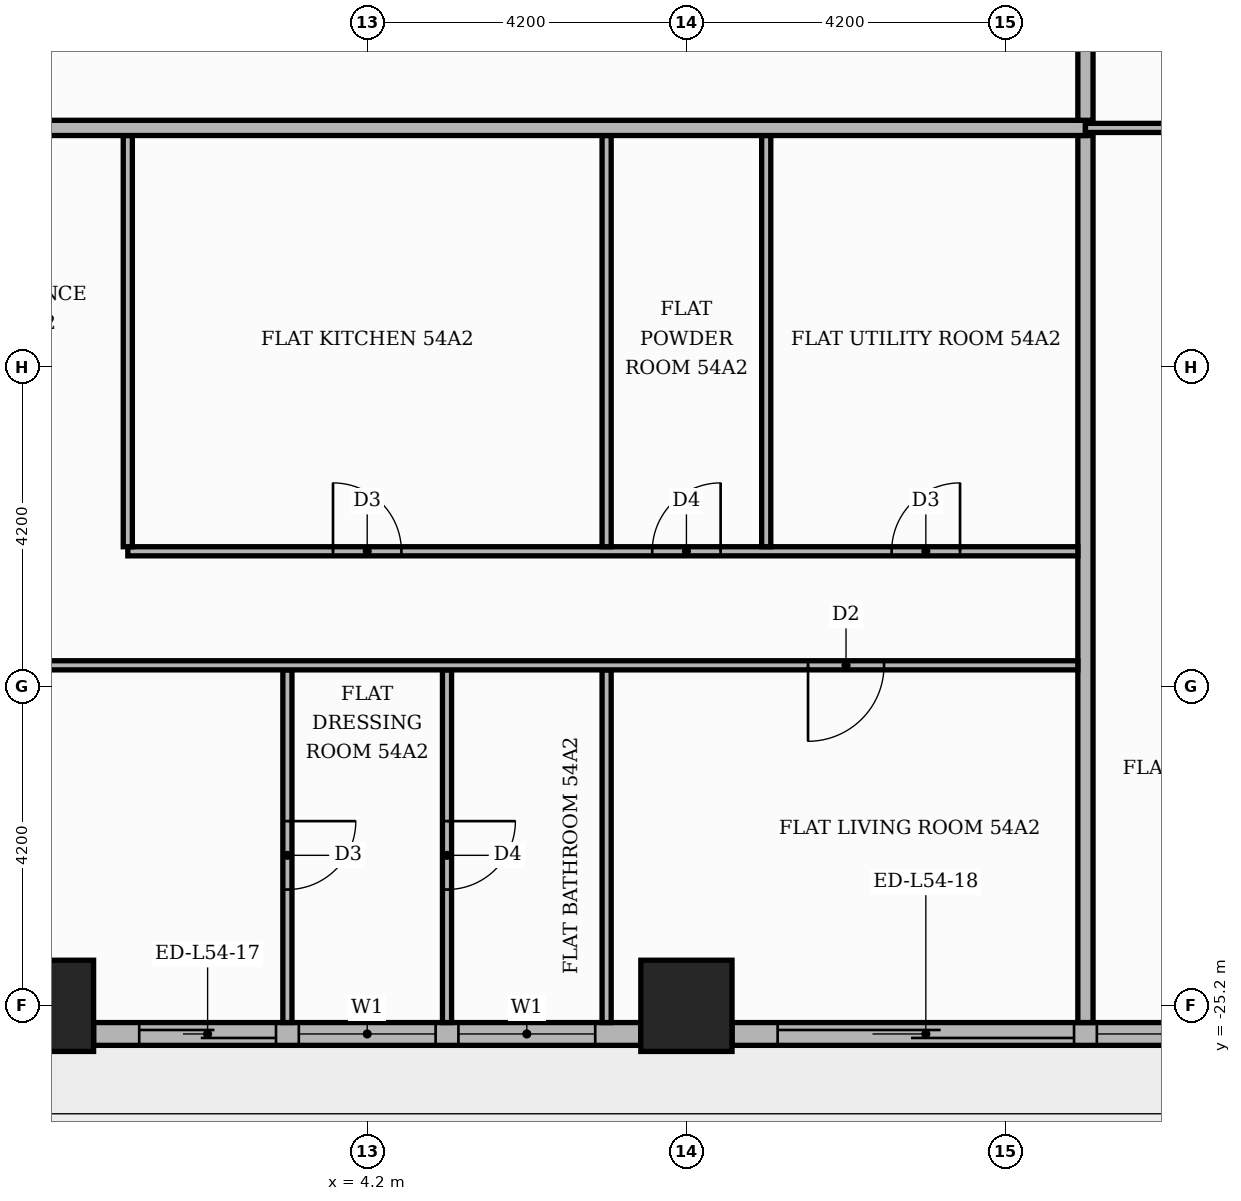
"""IFC4 building model, lengths in metres.
Left out: names, types, materials, properties, quantities, classifications, styles, units other than length and angle.
Written with IfcOpenShell. Run it as: python <this file> out.ifc"""

import sys

from ifc_helpers import new_model, si_unit, direction, frame, frame_2d, origin, origin_2d, place, context, subcontext, project, spatial, rectangle, extrude, element, fill, save


model = new_model("IFC4")
c1 = context("Model", 3, precision=1e-05, world=origin(), true_north=direction((0.0, 1.0)))
c2 = subcontext(c1, "Body", "Model", "MODEL_VIEW")
j1 = project(units=[si_unit("LENGTHUNIT", "METRE"), si_unit("PLANEANGLEUNIT", "RADIAN")], contexts=[c1])
p1 = place(None, origin())
s1 = spatial("IfcSite", under=j1, at=p1, CompositionType="ELEMENT")
p2 = place(p1, origin())
s2 = spatial("IfcBuilding", under=s1, at=p2, CompositionType="ELEMENT")
p3 = place(p2, frame((0.0, 0.0, 227.4)))
s3 = spatial("IfcBuildingStorey", under=s2, at=p3, CompositionType="ELEMENT", Elevation=227.4)
for number, where, z_axis, x_axis in (
    (1, (0.0, -25.2, 0.0), (0.0, 0.0, 1.0), (1.0, 0.0, 0.0)),
    (2, (8.4, -25.2, 0.0), (0.0, 0.0, 1.0), (1.0, 0.0, 0.0)),
):
    element("IfcColumn", number, at=place(p3, frame(where, z_axis=z_axis, x_axis=x_axis)), inside=s3, PredefinedType="COLUMN", context=c2, shape_type="SweptSolid", body=[
        extrude(rectangle(XDim=1.2, YDim=1.2, at=origin_2d()), origin(), (0.0, 0.0, 1.0), 3.9),
    ])
p4 = place(p3, frame((0.6, -25.57, 0.0), z_axis=(0.0, 0.0, 1.0), x_axis=(1.0, 0.0, 0.0)))
e3 = element("IfcWall", 3, at=p4, inside=s3, PredefinedType="STANDARD", context=c2, shape_type="SweptSolid", body=[
    extrude(rectangle(XDim=7.2, YDim=0.3, at=frame_2d((3.6, 0.0))), origin(), (0.0, 0.0, 1.0), 3.48),
])
p5 = place(p4, frame((0.6, 0.0, 0.0)))
e4 = element("IfcOpeningElement", 4, at=p5, cuts=e3, PredefinedType="OPENING", context=c2, shape_type="SweptSolid", body=[
    extrude(rectangle(XDim=1.8, YDim=2.4, at=frame_2d((0.9, 1.2))), frame((0.0, 0.16, 0.0), z_axis=(0.0, -1.0, 0.0), x_axis=(1.0, 0.0, 0.0)), (0.0, 0.0, 1.0), 0.32),
])
p6 = place(p4, frame((2.7, 0.0, 0.9)))
e5 = element("IfcOpeningElement", 5, at=p6, cuts=e3, PredefinedType="OPENING", context=c2, shape_type="SweptSolid", body=[
    extrude(rectangle(XDim=1.8, YDim=2.1, at=frame_2d((0.9, 1.05))), frame((0.0, 0.16, 0.0), z_axis=(0.0, -1.0, 0.0), x_axis=(1.0, 0.0, 0.0)), (0.0, 0.0, 1.0), 0.32),
])
p7 = place(p4, frame((4.8, 0.0, 0.9)))
e6 = element("IfcOpeningElement", 6, at=p7, cuts=e3, PredefinedType="OPENING", context=c2, shape_type="SweptSolid", body=[
    extrude(rectangle(XDim=1.8, YDim=2.1, at=frame_2d((0.9, 1.05))), frame((0.0, 0.16, 0.0), z_axis=(0.0, -1.0, 0.0), x_axis=(1.0, 0.0, 0.0)), (0.0, 0.0, 1.0), 0.32),
])
p8 = place(p3, frame((9.0, -25.57, 0.0), z_axis=(0.0, 0.0, 1.0), x_axis=(1.0, 0.0, 0.0)))
e7 = element("IfcWall", 7, at=p8, inside=s3, PredefinedType="STANDARD", context=c2, shape_type="SweptSolid", body=[
    extrude(rectangle(XDim=7.2, YDim=0.3, at=frame_2d((3.6, 0.0))), origin(), (0.0, 0.0, 1.0), 3.48),
])
p9 = place(p8, frame((0.6, 0.0, 0.0)))
e8 = element("IfcOpeningElement", 8, at=p9, cuts=e7, PredefinedType="OPENING", context=c2, shape_type="SweptSolid", body=[
    extrude(rectangle(XDim=3.9, YDim=2.4, at=frame_2d((1.95, 1.2))), frame((0.0, 0.16, 0.0), z_axis=(0.0, -1.0, 0.0), x_axis=(1.0, 0.0, 0.0)), (0.0, 0.0, 1.0), 0.32),
])
p10 = place(p8, frame((4.8, 0.0, 0.9)))
e9 = element("IfcOpeningElement", 9, at=p10, cuts=e7, PredefinedType="OPENING", context=c2, shape_type="SweptSolid", body=[
    extrude(rectangle(XDim=1.8, YDim=2.1, at=frame_2d((0.9, 1.05))), frame((0.0, 0.16, 0.0), z_axis=(0.0, -1.0, 0.0), x_axis=(1.0, 0.0, 0.0)), (0.0, 0.0, 1.0), 0.32),
])
p11 = place(p3, frame((3.15, -25.42, 0.0), z_axis=(0.0, 0.0, 1.0), x_axis=(0.0, 1.0, 0.0)))
e10 = element("IfcWall", 10, at=p11, inside=s3, PredefinedType="PARTITIONING", context=c2, shape_type="SweptSolid", body=[
    extrude(rectangle(XDim=4.64, YDim=0.12, at=frame_2d((2.32, 0.0))), origin(), (0.0, 0.0, 1.0), 3.48),
])
p12 = place(p11, frame((1.75, 0.0, 0.0)))
e11 = element("IfcOpeningElement", 11, at=p12, cuts=e10, PredefinedType="OPENING", context=c2, shape_type="SweptSolid", body=[
    extrude(rectangle(XDim=0.9, YDim=2.1, at=frame_2d((0.45, 1.05))), frame((0.0, 0.07, 0.0), z_axis=(0.0, -1.0, 0.0), x_axis=(1.0, 0.0, 0.0)), (0.0, 0.0, 1.0), 0.14),
])
p13 = place(p3, frame((5.25, -25.42, 0.0), z_axis=(0.0, 0.0, 1.0), x_axis=(0.0, 1.0, 0.0)))
e12 = element("IfcWall", 12, at=p13, inside=s3, PredefinedType="PARTITIONING", context=c2, shape_type="SweptSolid", body=[
    extrude(rectangle(XDim=4.64, YDim=0.12, at=frame_2d((2.32, 0.0))), origin(), (0.0, 0.0, 1.0), 3.48),
])
p14 = place(p13, frame((1.75, 0.0, 0.0)))
e13 = element("IfcOpeningElement", 13, at=p14, cuts=e12, PredefinedType="OPENING", context=c2, shape_type="SweptSolid", body=[
    extrude(rectangle(XDim=0.9, YDim=2.1, at=frame_2d((0.45, 1.05))), frame((0.0, 0.07, 0.0), z_axis=(0.0, -1.0, 0.0), x_axis=(1.0, 0.0, 0.0)), (0.0, 0.0, 1.0), 0.14),
])
p15 = place(p3, frame((7.35, -25.42, 0.0), z_axis=(0.0, 0.0, 1.0), x_axis=(0.0, 1.0, 0.0)))
e14 = element("IfcWall", 14, at=p15, inside=s3, PredefinedType="PARTITIONING", context=c2, shape_type="SweptSolid", body=[
    extrude(rectangle(XDim=4.64, YDim=0.12, at=frame_2d((2.32, 0.0))), origin(), (0.0, 0.0, 1.0), 3.48),
])
p16 = place(p3, frame((13.65, -25.42, 0.0), z_axis=(0.0, 0.0, 1.0), x_axis=(0.0, 1.0, 0.0)))
e15 = element("IfcWall", 15, at=p16, inside=s3, PredefinedType="PARTITIONING", context=c2, shape_type="SweptSolid", body=[
    extrude(rectangle(XDim=11.67, YDim=0.2, at=frame_2d((5.835, 0.0))), origin(), (0.0, 0.0, 1.0), 3.48),
])
p17 = place(p3, frame((-5.15, -20.72, 0.0), z_axis=(0.0, 0.0, 1.0), x_axis=(1.0, 0.0, 0.0)))
e16 = element("IfcWall", 16, at=p17, inside=s3, PredefinedType="PARTITIONING", context=c2, shape_type="SweptSolid", body=[
    extrude(rectangle(XDim=18.7, YDim=0.12, at=frame_2d((9.35, 0.0))), origin(), (0.0, 0.0, 1.0), 3.48),
])
p18 = place(p17, frame((3.65, 0.0, 0.0)))
e17 = element("IfcOpeningElement", 17, at=p18, cuts=e16, PredefinedType="OPENING", context=c2, shape_type="SweptSolid", body=[
    extrude(rectangle(XDim=0.9, YDim=2.1, at=frame_2d((0.45, 1.05))), frame((0.0, 0.07, 0.0), z_axis=(0.0, -1.0, 0.0), x_axis=(1.0, 0.0, 0.0)), (0.0, 0.0, 1.0), 0.14),
])
p19 = place(p17, frame((15.15, 0.0, 0.0)))
e18 = element("IfcOpeningElement", 18, at=p19, cuts=e16, PredefinedType="OPENING", context=c2, shape_type="SweptSolid", body=[
    extrude(rectangle(XDim=1.0, YDim=2.1, at=frame_2d((0.5, 1.05))), frame((0.0, 0.07, 0.0), z_axis=(0.0, -1.0, 0.0), x_axis=(1.0, 0.0, 0.0)), (0.0, 0.0, 1.0), 0.14),
])
p20 = place(p3, frame((1.05, -19.22, 0.0), z_axis=(0.0, 0.0, 1.0), x_axis=(1.0, 0.0, 0.0)))
e19 = element("IfcWall", 19, at=p20, inside=s3, PredefinedType="PARTITIONING", context=c2, shape_type="SweptSolid", body=[
    extrude(rectangle(XDim=12.5, YDim=0.12, at=frame_2d((6.25, 0.0))), origin(), (0.0, 0.0, 1.0), 3.48),
])
p21 = place(p20, frame((2.7, 0.0, 0.0)))
e20 = element("IfcOpeningElement", 20, at=p21, cuts=e19, PredefinedType="OPENING", context=c2, shape_type="SweptSolid", body=[
    extrude(rectangle(XDim=0.9, YDim=2.1, at=frame_2d((0.45, 1.05))), frame((0.0, 0.07, 0.0), z_axis=(0.0, -1.0, 0.0), x_axis=(1.0, 0.0, 0.0)), (0.0, 0.0, 1.0), 0.14),
])
p22 = place(p20, frame((6.9, 0.0, 0.0)))
e21 = element("IfcOpeningElement", 21, at=p22, cuts=e19, PredefinedType="OPENING", context=c2, shape_type="SweptSolid", body=[
    extrude(rectangle(XDim=0.9, YDim=2.1, at=frame_2d((0.45, 1.05))), frame((0.0, 0.07, 0.0), z_axis=(0.0, -1.0, 0.0), x_axis=(1.0, 0.0, 0.0)), (0.0, 0.0, 1.0), 0.14),
])
p23 = place(p20, frame((10.05, 0.0, 0.0)))
e22 = element("IfcOpeningElement", 22, at=p23, cuts=e19, PredefinedType="OPENING", context=c2, shape_type="SweptSolid", body=[
    extrude(rectangle(XDim=0.9, YDim=2.1, at=frame_2d((0.45, 1.05))), frame((0.0, 0.07, 0.0), z_axis=(0.0, -1.0, 0.0), x_axis=(1.0, 0.0, 0.0)), (0.0, 0.0, 1.0), 0.14),
])
for number, where, z_axis, x_axis in (
    (23, (1.05, -19.16, 0.0), (0.0, 0.0, 1.0), (0.0, 1.0, 0.0)),
    (24, (7.35, -19.16, 0.0), (0.0, 0.0, 1.0), (0.0, 1.0, 0.0)),
    (25, (9.45, -19.16, 0.0), (0.0, 0.0, 1.0), (0.0, 1.0, 0.0)),
):
    element("IfcWall", number, at=place(p3, frame(where, z_axis=z_axis, x_axis=x_axis)), inside=s3, PredefinedType="PARTITIONING", context=c2, shape_type="SweptSolid", body=[
        extrude(rectangle(XDim=5.41, YDim=0.12, at=frame_2d((2.705, 0.0))), origin(), (0.0, 0.0, 1.0), 3.48),
    ])
p24 = place(p3, frame((-25.42, -13.65, 0.0), z_axis=(0.0, 0.0, 1.0), x_axis=(1.0, 0.0, 0.0)))
e26 = element("IfcWall", 26, at=p24, inside=s3, PredefinedType="PARTITIONING", context=c2, shape_type="SweptSolid", body=[
    extrude(rectangle(XDim=39.07, YDim=0.2, at=frame_2d((19.535, 0.0))), origin(), (0.0, 0.0, 1.0), 3.48),
])
p25 = place(p24, frame((13.32, 0.0, 0.0)))
e27 = element("IfcOpeningElement", 27, at=p25, cuts=e26, PredefinedType="OPENING", context=c2, shape_type="SweptSolid", body=[
    extrude(rectangle(XDim=1.1, YDim=2.4, at=frame_2d((0.55, 1.2))), frame((0.0, 0.11, 0.0), z_axis=(0.0, -1.0, 0.0), x_axis=(1.0, 0.0, 0.0)), (0.0, 0.0, 1.0), 0.22),
])
p26 = place(p24, frame((23.82, 0.0, 0.0)))
e28 = element("IfcOpeningElement", 28, at=p26, cuts=e26, PredefinedType="OPENING", context=c2, shape_type="SweptSolid", body=[
    extrude(rectangle(XDim=1.1, YDim=2.4, at=frame_2d((0.55, 1.2))), frame((0.0, 0.11, 0.0), z_axis=(0.0, -1.0, 0.0), x_axis=(1.0, 0.0, 0.0)), (0.0, 0.0, 1.0), 0.22),
])
p27 = place(p3, frame((13.65, -13.65, 0.0), z_axis=(0.0, 0.0, 1.0), x_axis=(1.0, 0.0, 0.0)))
e29 = element("IfcWall", 29, at=p27, inside=s3, PredefinedType="PARTITIONING", context=c2, shape_type="SweptSolid", body=[
    extrude(rectangle(XDim=6.769, YDim=0.12, at=frame_2d((3.385, 0.0))), origin(), (0.0, 0.0, 1.0), 3.48),
])
p28 = place(p27, frame((2.885, 0.0, 0.0)))
e30 = element("IfcOpeningElement", 30, at=p28, cuts=e29, PredefinedType="OPENING", context=c2, shape_type="SweptSolid", body=[
    extrude(rectangle(XDim=1.0, YDim=2.1, at=frame_2d((0.5, 1.05))), frame((0.0, 0.07, 0.0), z_axis=(0.0, -1.0, 0.0), x_axis=(1.0, 0.0, 0.0)), (0.0, 0.0, 1.0), 0.14),
])
p29 = place(p3, frame((13.65, -13.55, 0.0), z_axis=(0.0, 0.0, 1.0), x_axis=(0.0, 1.0, 0.0)))
e31 = element("IfcWall", 31, at=p29, inside=s3, PredefinedType="PARTITIONING", context=c2, shape_type="SweptSolid", body=[
    extrude(rectangle(XDim=2.45, YDim=0.2, at=frame_2d((1.225, 0.0))), origin(), (0.0, 0.0, 1.0), 3.48),
])
p30 = place(p5, origin())
e32 = element("IfcDoor", 32, at=p30, inside=s3, OperationType="SLIDING_TO_LEFT", PredefinedType="DOOR", context=c2, shape_type="SweptSolid", body=[
    extrude(rectangle(XDim=1.8, YDim=2.4, at=frame_2d((0.9, 1.2))), frame((0.0, 0.025, 0.0), z_axis=(0.0, -1.0, 0.0), x_axis=(1.0, 0.0, 0.0)), (0.0, 0.0, 1.0), 0.05),
])
fill(e4, e32)
p31 = place(p6, origin())
e33 = element("IfcWindow", 33, at=p31, inside=s3, PartitioningType="SINGLE_PANEL", PredefinedType="WINDOW", context=c2, shape_type="SweptSolid", body=[
    extrude(rectangle(XDim=1.8, YDim=2.1, at=frame_2d((0.9, 1.05))), frame((0.0, 0.03, 0.0), z_axis=(0.0, -1.0, 0.0), x_axis=(1.0, 0.0, 0.0)), (0.0, 0.0, 1.0), 0.06),
])
fill(e5, e33)
p32 = place(p7, origin())
e34 = element("IfcWindow", 34, at=p32, inside=s3, PartitioningType="SINGLE_PANEL", PredefinedType="WINDOW", context=c2, shape_type="SweptSolid", body=[
    extrude(rectangle(XDim=1.8, YDim=2.1, at=frame_2d((0.9, 1.05))), frame((0.0, 0.03, 0.0), z_axis=(0.0, -1.0, 0.0), x_axis=(1.0, 0.0, 0.0)), (0.0, 0.0, 1.0), 0.06),
])
fill(e6, e34)
p33 = place(p9, origin())
e35 = element("IfcDoor", 35, at=p33, inside=s3, OperationType="SLIDING_TO_LEFT", PredefinedType="DOOR", context=c2, shape_type="SweptSolid", body=[
    extrude(rectangle(XDim=3.9, YDim=2.4, at=frame_2d((1.95, 1.2))), frame((0.0, 0.025, 0.0), z_axis=(0.0, -1.0, 0.0), x_axis=(1.0, 0.0, 0.0)), (0.0, 0.0, 1.0), 0.05),
])
fill(e8, e35)
p34 = place(p10, origin())
e36 = element("IfcWindow", 36, at=p34, inside=s3, PartitioningType="SINGLE_PANEL", PredefinedType="WINDOW", context=c2, shape_type="SweptSolid", body=[
    extrude(rectangle(XDim=1.8, YDim=2.1, at=frame_2d((0.9, 1.05))), frame((0.0, 0.03, 0.0), z_axis=(0.0, -1.0, 0.0), x_axis=(1.0, 0.0, 0.0)), (0.0, 0.0, 1.0), 0.06),
])
fill(e9, e36)
p35 = place(p21, origin())
e37 = element("IfcDoor", 37, at=p35, inside=s3, OperationType="SINGLE_SWING_LEFT", PredefinedType="DOOR", context=c2, shape_type="SweptSolid", body=[
    extrude(rectangle(XDim=0.9, YDim=2.1, at=frame_2d((0.45, 1.05))), frame((0.0, 0.025, 0.0), z_axis=(0.0, -1.0, 0.0), x_axis=(1.0, 0.0, 0.0)), (0.0, 0.0, 1.0), 0.05),
])
fill(e20, e37)
p36 = place(p22, origin())
e38 = element("IfcDoor", 38, at=p36, inside=s3, OperationType="SINGLE_SWING_RIGHT", PredefinedType="DOOR", context=c2, shape_type="SweptSolid", body=[
    extrude(rectangle(XDim=0.9, YDim=2.1, at=frame_2d((0.45, 1.05))), frame((0.0, 0.025, 0.0), z_axis=(0.0, -1.0, 0.0), x_axis=(1.0, 0.0, 0.0)), (0.0, 0.0, 1.0), 0.05),
])
fill(e21, e38)
p37 = place(p23, origin())
e39 = element("IfcDoor", 39, at=p37, inside=s3, OperationType="SINGLE_SWING_RIGHT", PredefinedType="DOOR", context=c2, shape_type="SweptSolid", body=[
    extrude(rectangle(XDim=0.9, YDim=2.1, at=frame_2d((0.45, 1.05))), frame((0.0, 0.025, 0.0), z_axis=(0.0, -1.0, 0.0), x_axis=(1.0, 0.0, 0.0)), (0.0, 0.0, 1.0), 0.05),
])
fill(e22, e39)
p38 = place(p12, frame((0.9, 0.0, 0.0), z_axis=(0.0, 0.0, 1.0), x_axis=(-1.0, 0.0, 0.0)))
e40 = element("IfcDoor", 40, at=p38, inside=s3, OperationType="SINGLE_SWING_RIGHT", PredefinedType="DOOR", context=c2, shape_type="SweptSolid", body=[
    extrude(rectangle(XDim=0.9, YDim=2.1, at=frame_2d((0.45, 1.05))), frame((0.0, 0.025, 0.0), z_axis=(0.0, -1.0, 0.0), x_axis=(1.0, 0.0, 0.0)), (0.0, 0.0, 1.0), 0.05),
])
fill(e11, e40)
p39 = place(p14, frame((0.9, 0.0, 0.0), z_axis=(0.0, 0.0, 1.0), x_axis=(-1.0, 0.0, 0.0)))
e41 = element("IfcDoor", 41, at=p39, inside=s3, OperationType="SINGLE_SWING_RIGHT", PredefinedType="DOOR", context=c2, shape_type="SweptSolid", body=[
    extrude(rectangle(XDim=0.9, YDim=2.1, at=frame_2d((0.45, 1.05))), frame((0.0, 0.025, 0.0), z_axis=(0.0, -1.0, 0.0), x_axis=(1.0, 0.0, 0.0)), (0.0, 0.0, 1.0), 0.05),
])
fill(e13, e41)
p40 = place(p19, frame((1.0, 0.0, 0.0), z_axis=(0.0, 0.0, 1.0), x_axis=(-1.0, 0.0, 0.0)))
e42 = element("IfcDoor", 42, at=p40, inside=s3, OperationType="SINGLE_SWING_LEFT", PredefinedType="DOOR", context=c2, shape_type="SweptSolid", body=[
    extrude(rectangle(XDim=1.0, YDim=2.1, at=frame_2d((0.5, 1.05))), frame((0.0, 0.025, 0.0), z_axis=(0.0, -1.0, 0.0), x_axis=(1.0, 0.0, 0.0)), (0.0, 0.0, 1.0), 0.05),
])
fill(e18, e42)
save(model, sys.argv[1])
